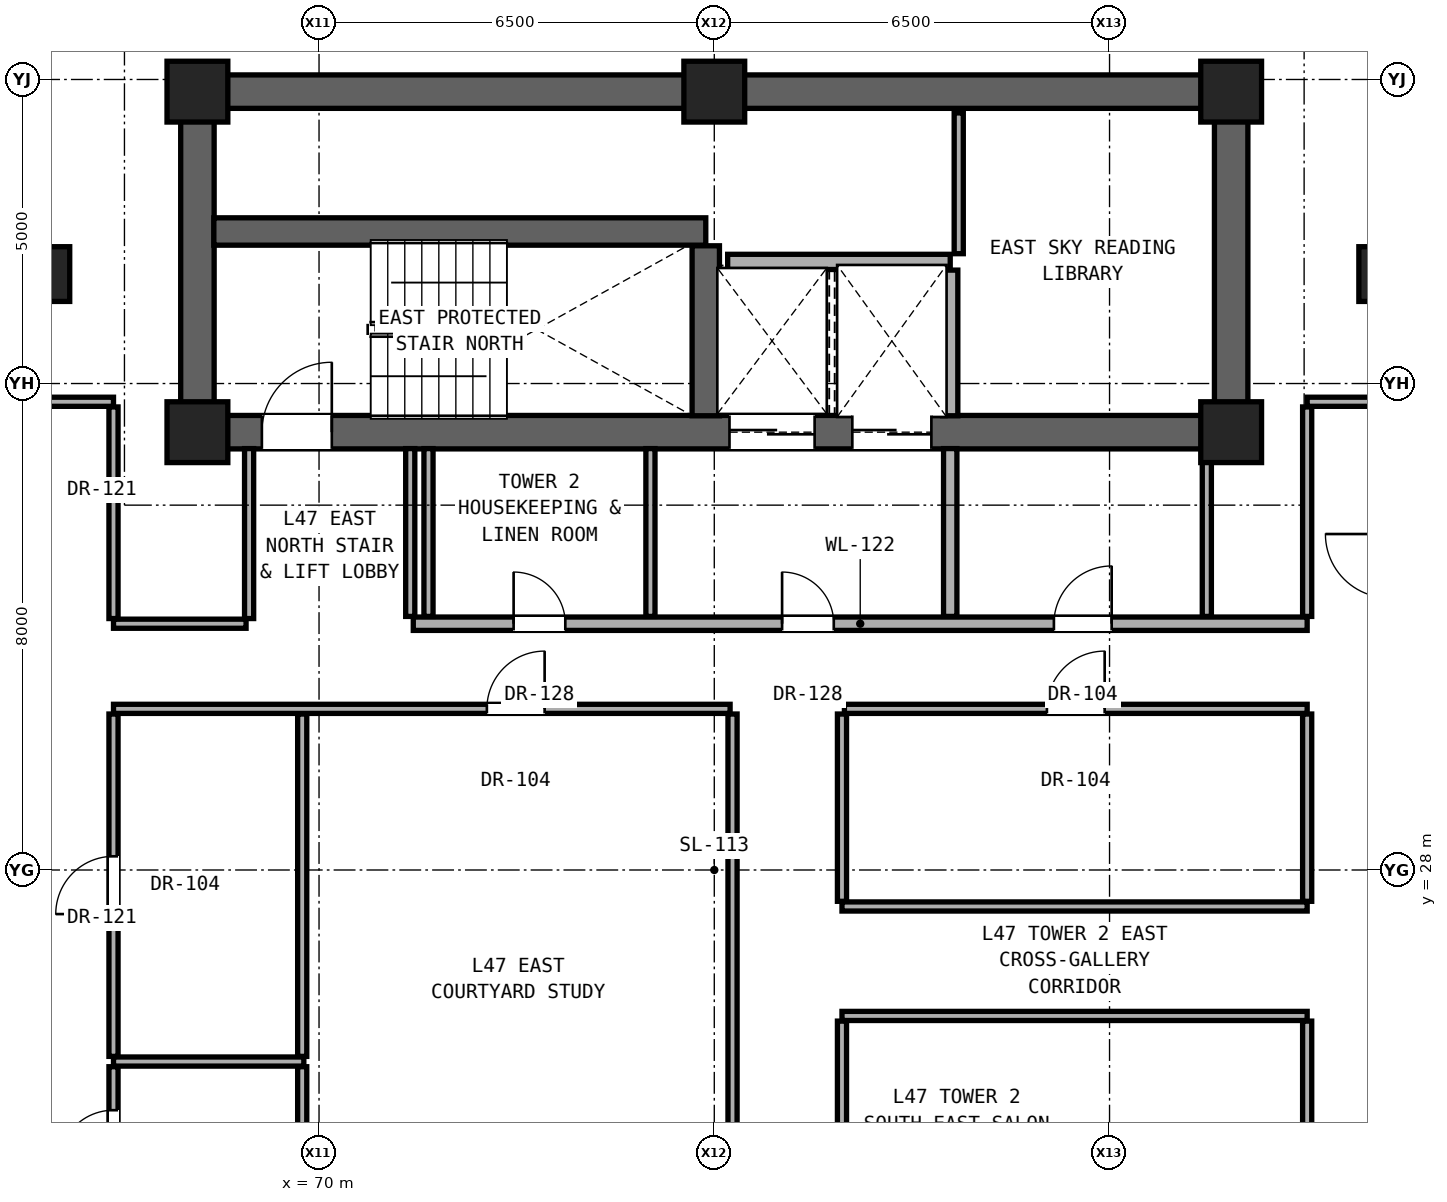
"""IFC4 building model, lengths in metres.
Left out: names, types, materials, properties, quantities, classifications, styles, units other than length and angle.
Written with IfcOpenShell. Run it as: python <this file> out.ifc"""

import sys

from ifc_helpers import new_model, si_unit, direction, frame, frame_2d, origin, origin_2d, place, context, subcontext, project, spatial, rectangle, extrude, element, fill, save


model = new_model("IFC4")
c1 = context("Model", 3, precision=1e-05, world=origin(), true_north=direction((0.0, 1.0)))
c2 = subcontext(c1, "Body", "Model", "MODEL_VIEW")
j1 = project(units=[si_unit("LENGTHUNIT", "METRE"), si_unit("PLANEANGLEUNIT", "RADIAN")], contexts=[c1])
p1 = place(None, origin())
s1 = spatial("IfcSite", under=j1, at=p1, CompositionType="ELEMENT")
p2 = place(p1, origin())
s2 = spatial("IfcBuilding", under=s1, at=p2, CompositionType="ELEMENT")
p3 = place(p2, frame((0.0, 0.0, 167.4)))
s3 = spatial("IfcBuildingStorey", under=s2, at=p3, CompositionType="ELEMENT", Elevation=167.4)
for number, where, z_axis, x_axis in (
    (1, (68.0, 35.2, 0.0), (0.0, 0.0, 1.0), (1.0, 0.0, 0.0)),
    (2, (85.0, 35.2, 0.0), (0.0, 0.0, 1.0), (1.0, 0.0, 0.0)),
    (3, (68.0, 40.8, 0.0), (0.0, 0.0, 1.0), (1.0, 0.0, 0.0)),
    (4, (76.5, 40.8, 0.0), (0.0, 0.0, 1.0), (1.0, 0.0, 0.0)),
    (5, (85.0, 40.8, 0.0), (0.0, 0.0, 1.0), (1.0, 0.0, 0.0)),
):
    element("IfcColumn", number, at=place(p3, frame(where, z_axis=z_axis, x_axis=x_axis)), inside=s3, PredefinedType="COLUMN", context=c2, shape_type="SweptSolid", body=[
        extrude(rectangle(XDim=1.0, YDim=1.0, at=origin_2d()), origin(), (0.0, 0.0, 1.0), 3.25),
    ])
for number, where, z_axis, x_axis in (
    (6, (65.6, 37.8, 0.0), (0.0, 0.0, 1.0), (1.0, 0.0, 0.0)),
    (7, (87.4, 37.8, 0.0), (0.0, 0.0, 1.0), (1.0, 0.0, 0.0)),
):
    element("IfcColumn", number, at=place(p3, frame(where, z_axis=z_axis, x_axis=x_axis)), inside=s3, PredefinedType="PILASTER", context=c2, shape_type="SweptSolid", body=[
        extrude(rectangle(XDim=0.6, YDim=0.9, at=origin_2d()), origin(), (0.0, 0.0, 1.0), 3.25),
    ])
p4 = place(p3, frame((68.0, 40.8, 0.0), z_axis=(0.0, 0.0, 1.0), x_axis=(1.0, 0.0, 0.0)))
e8 = element("IfcWall", 8, at=p4, inside=s3, PredefinedType="SHEAR", context=c2, shape_type="SweptSolid", body=[
    extrude(rectangle(XDim=17.0, YDim=0.55, at=frame_2d((8.5, 0.0))), origin(), (0.0, 0.0, 1.0), 3.05),
])
for number, where, z_axis, x_axis in (
    (9, (68.0, 35.2, 0.0), (0.0, 0.0, 1.0), (0.0, 1.0, 0.0)),
    (10, (85.0, 35.2, 0.0), (0.0, 0.0, 1.0), (0.0, 1.0, 0.0)),
):
    element("IfcWall", number, at=place(p3, frame(where, z_axis=z_axis, x_axis=x_axis)), inside=s3, PredefinedType="SHEAR", context=c2, shape_type="SweptSolid", body=[
        extrude(rectangle(XDim=5.6, YDim=0.55, at=frame_2d((2.8, 0.0))), origin(), (0.0, 0.0, 1.0), 3.05),
    ])
p5 = place(p3, frame((68.0, 35.2, 0.0), z_axis=(0.0, 0.0, 1.0), x_axis=(1.0, 0.0, 0.0)))
e11 = element("IfcWall", 11, at=p5, inside=s3, PredefinedType="SHEAR", context=c2, shape_type="SweptSolid", body=[
    extrude(rectangle(XDim=17.0, YDim=0.55, at=frame_2d((8.5, 0.0))), origin(), (0.0, 0.0, 1.0), 3.05),
])
p6 = place(p5, frame((1.06, 0.0, 0.0)))
e12 = element("IfcOpeningElement", 12, at=p6, cuts=e11, PredefinedType="OPENING", context=c2, shape_type="SweptSolid", body=[
    extrude(rectangle(XDim=1.15, YDim=2.2, at=frame_2d((0.575, 1.1))), frame((0.0, 0.285, 0.0), z_axis=(0.0, -1.0, 0.0), x_axis=(1.0, 0.0, 0.0)), (0.0, 0.0, 1.0), 0.57),
])
p7 = place(p5, frame((8.75, 0.0, 0.0)))
e13 = element("IfcOpeningElement", 13, at=p7, cuts=e11, PredefinedType="OPENING", context=c2, shape_type="SweptSolid", body=[
    extrude(rectangle(XDim=1.4, YDim=2.35, at=frame_2d((0.7, 1.175))), frame((0.0, 0.285, 0.0), z_axis=(0.0, -1.0, 0.0), x_axis=(1.0, 0.0, 0.0)), (0.0, 0.0, 1.0), 0.57),
])
p8 = place(p5, frame((10.77, 0.0, 0.0)))
e14 = element("IfcOpeningElement", 14, at=p8, cuts=e11, PredefinedType="OPENING", context=c2, shape_type="SweptSolid", body=[
    extrude(rectangle(XDim=1.3, YDim=2.3, at=frame_2d((0.65, 1.15))), frame((0.0, 0.285, 0.0), z_axis=(0.0, -1.0, 0.0), x_axis=(1.0, 0.0, 0.0)), (0.0, 0.0, 1.0), 0.57),
])
p9 = place(p3, frame((66.62, 24.85, 0.0), z_axis=(0.0, 0.0, 1.0), x_axis=(1.0, 0.0, 0.0)))
e15 = element("IfcWall", 15, at=p9, inside=s3, PredefinedType="PARTITIONING", context=c2, shape_type="SweptSolid", body=[
    extrude(rectangle(XDim=3.13, YDim=0.15, at=frame_2d((1.565, 0.0))), origin(), (0.0, 0.0, 1.0), 2.186),
])
for number, where, z_axis, x_axis in (
    (16, (78.6, 25.6, 0.0), (0.0, 0.0, 1.0), (1.0, 0.0, 0.0)),
    (17, (78.6, 27.4, 0.0), (0.0, 0.0, 1.0), (1.0, 0.0, 0.0)),
):
    element("IfcWall", number, at=place(p3, frame(where, z_axis=z_axis, x_axis=x_axis)), inside=s3, PredefinedType="PARTITIONING", context=c2, shape_type="SweptSolid", body=[
        extrude(rectangle(XDim=7.65, YDim=0.15, at=frame_2d((3.825, 0.0))), origin(), (0.0, 0.0, 1.0), 2.186),
    ])
p10 = place(p3, frame((66.62, 30.65, 0.0), z_axis=(0.0, 0.0, 1.0), x_axis=(1.0, 0.0, 0.0)))
e18 = element("IfcWall", 18, at=p10, inside=s3, PredefinedType="PARTITIONING", context=c2, shape_type="SweptSolid", body=[
    extrude(rectangle(XDim=10.14, YDim=0.15, at=frame_2d((5.07, 0.0))), origin(), (0.0, 0.0, 1.0), 2.186),
])
p11 = place(p10, frame((6.14, 0.0, 0.0)))
e19 = element("IfcOpeningElement", 19, at=p11, cuts=e18, PredefinedType="OPENING", context=c2, shape_type="SweptSolid", body=[
    extrude(rectangle(XDim=0.95, YDim=2.15, at=frame_2d((0.475, 1.075))), frame((0.0, 0.085, 0.0), z_axis=(0.0, -1.0, 0.0), x_axis=(1.0, 0.0, 0.0)), (0.0, 0.0, 1.0), 0.17),
])
p12 = place(p3, frame((78.64, 30.65, 0.0), z_axis=(0.0, 0.0, 1.0), x_axis=(1.0, 0.0, 0.0)))
e20 = element("IfcWall", 20, at=p12, inside=s3, PredefinedType="PARTITIONING", context=c2, shape_type="SweptSolid", body=[
    extrude(rectangle(XDim=7.61, YDim=0.15, at=frame_2d((3.805, 0.0))), origin(), (0.0, 0.0, 1.0), 2.186),
])
p13 = place(p12, frame((3.33, 0.0, 0.0)))
e21 = element("IfcOpeningElement", 21, at=p13, cuts=e20, PredefinedType="OPENING", context=c2, shape_type="SweptSolid", body=[
    extrude(rectangle(XDim=0.95, YDim=2.15, at=frame_2d((0.475, 1.075))), frame((0.0, 0.085, 0.0), z_axis=(0.0, -1.0, 0.0), x_axis=(1.0, 0.0, 0.0)), (0.0, 0.0, 1.0), 0.17),
])
p14 = place(p3, frame((66.62, 32.05, 0.0), z_axis=(0.0, 0.0, 1.0), x_axis=(1.0, 0.0, 0.0)))
e22 = element("IfcWall", 22, at=p14, inside=s3, PredefinedType="PARTITIONING", context=c2, shape_type="SweptSolid", body=[
    extrude(rectangle(XDim=2.18, YDim=0.15, at=frame_2d((1.09, 0.0))), origin(), (0.0, 0.0, 1.0), 2.186),
])
p15 = place(p3, frame((71.55, 32.05, 0.0), z_axis=(0.0, 0.0, 1.0), x_axis=(1.0, 0.0, 0.0)))
e23 = element("IfcWall", 23, at=p15, inside=s3, PredefinedType="SOLIDWALL", context=c2, shape_type="SweptSolid", body=[
    extrude(rectangle(XDim=14.7, YDim=0.22, at=frame_2d((7.35, 0.0))), origin(), (0.0, 0.0, 1.0), 2.186),
])
p16 = place(p15, frame((6.065, 0.0, 0.0)))
e24 = element("IfcOpeningElement", 24, at=p16, cuts=e23, PredefinedType="OPENING", context=c2, shape_type="SweptSolid", body=[
    extrude(rectangle(XDim=0.85, YDim=2.01, at=frame_2d((0.425, 1.005))), frame((0.0, 0.12, 0.0), z_axis=(0.0, -1.0, 0.0), x_axis=(1.0, 0.0, 0.0)), (0.0, 0.0, 1.0), 0.24),
])
p17 = place(p15, frame((10.535, 0.0, 0.0)))
e25 = element("IfcOpeningElement", 25, at=p17, cuts=e23, PredefinedType="OPENING", context=c2, shape_type="SweptSolid", body=[
    extrude(rectangle(XDim=0.95, YDim=2.15, at=frame_2d((0.475, 1.075))), frame((0.0, 0.12, 0.0), z_axis=(0.0, -1.0, 0.0), x_axis=(1.0, 0.0, 0.0)), (0.0, 0.0, 1.0), 0.24),
])
p18 = place(p15, frame((1.65, 0.0, 0.0)))
e26 = element("IfcOpeningElement", 26, at=p18, cuts=e23, PredefinedType="OPENING", context=c2, shape_type="SweptSolid", body=[
    extrude(rectangle(XDim=0.85, YDim=2.01, at=frame_2d((0.425, 1.005))), frame((0.0, 0.12, 0.0), z_axis=(0.0, -1.0, 0.0), x_axis=(1.0, 0.0, 0.0)), (0.0, 0.0, 1.0), 0.24),
])
p19 = place(p3, frame((65.25, 35.7, 0.0), z_axis=(0.0, 0.0, 1.0), x_axis=(1.0, 0.0, 0.0)))
e27 = element("IfcWall", 27, at=p19, inside=s3, PredefinedType="PARTITIONING", context=c2, shape_type="SweptSolid", body=[
    extrude(rectangle(XDim=1.37, YDim=0.15, at=frame_2d((0.685, 0.0))), origin(), (0.0, 0.0, 1.0), 3.05),
])
p20 = place(p3, frame((86.25, 35.7, 0.0), z_axis=(0.0, 0.0, 1.0), x_axis=(1.0, 0.0, 0.0)))
e28 = element("IfcWall", 28, at=p20, inside=s3, PredefinedType="PARTITIONING", context=c2, shape_type="SweptSolid", body=[
    extrude(rectangle(XDim=1.35, YDim=0.15, at=frame_2d((0.675, 0.0))), origin(), (0.0, 0.0, 1.0), 3.05),
])
p21 = place(p3, frame((76.72, 38.0, 0.0), z_axis=(0.0, 0.0, 1.0), x_axis=(1.0, 0.0, 0.0)))
e29 = element("IfcWall", 29, at=p21, inside=s3, PredefinedType="SOLIDWALL", context=c2, shape_type="SweptSolid", body=[
    extrude(rectangle(XDim=3.66, YDim=0.25, at=frame_2d((1.83, 0.0))), origin(), (0.0, 0.0, 1.0), 3.05),
])
p22 = place(p3, frame((68.27, 38.5, 0.0), z_axis=(0.0, 0.0, 1.0), x_axis=(1.0, 0.0, 0.0)))
e30 = element("IfcWall", 30, at=p22, inside=s3, PredefinedType="SHEAR", context=c2, shape_type="SweptSolid", body=[
    extrude(rectangle(XDim=8.09, YDim=0.45, at=frame_2d((4.045, 0.0))), origin(), (0.0, 0.0, 1.0), 3.05),
])
p23 = place(p3, frame((66.62, 22.435, 0.0), z_axis=(0.0, 0.0, 1.0), x_axis=(0.0, 1.0, 0.0)))
e31 = element("IfcWall", 31, at=p23, inside=s3, PredefinedType="PARTITIONING", context=c2, shape_type="SweptSolid", body=[
    extrude(rectangle(XDim=2.33, YDim=0.15, at=frame_2d((1.165, 0.0))), origin(), (0.0, 0.0, 1.0), 3.05),
])
p24 = place(p23, frame((0.715, 0.0, 0.0)))
e32 = element("IfcOpeningElement", 32, at=p24, cuts=e31, PredefinedType="OPENING", context=c2, shape_type="SweptSolid", body=[
    extrude(rectangle(XDim=0.9, YDim=2.1, at=frame_2d((0.45, 1.05))), frame((0.0, 0.085, 0.0), z_axis=(0.0, -1.0, 0.0), x_axis=(1.0, 0.0, 0.0)), (0.0, 0.0, 1.0), 0.17),
])
p25 = place(p3, frame((66.62, 24.935, 0.0), z_axis=(0.0, 0.0, 1.0), x_axis=(0.0, 1.0, 0.0)))
e33 = element("IfcWall", 33, at=p25, inside=s3, PredefinedType="PARTITIONING", context=c2, shape_type="SweptSolid", body=[
    extrude(rectangle(XDim=5.63, YDim=0.15, at=frame_2d((2.815, 0.0))), origin(), (0.0, 0.0, 1.0), 2.346),
])
p26 = place(p25, frame((2.34, 0.0, 0.0)))
e34 = element("IfcOpeningElement", 34, at=p26, cuts=e33, PredefinedType="OPENING", context=c2, shape_type="SweptSolid", body=[
    extrude(rectangle(XDim=0.95, YDim=2.15, at=frame_2d((0.475, 1.075))), frame((0.0, 0.085, 0.0), z_axis=(0.0, -1.0, 0.0), x_axis=(1.0, 0.0, 0.0)), (0.0, 0.0, 1.0), 0.17),
])
p27 = place(p3, frame((66.62, 32.135, 0.0), z_axis=(0.0, 0.0, 1.0), x_axis=(0.0, 1.0, 0.0)))
e35 = element("IfcWall", 35, at=p27, inside=s3, PredefinedType="PARTITIONING", context=c2, shape_type="SweptSolid", body=[
    extrude(rectangle(XDim=3.48, YDim=0.15, at=frame_2d((1.74, 0.0))), origin(), (0.0, 0.0, 1.0), 2.442),
])
p28 = place(p3, frame((68.85, 32.135, 0.0), z_axis=(0.0, 0.0, 1.0), x_axis=(0.0, 1.0, 0.0)))
e36 = element("IfcWall", 36, at=p28, inside=s3, PredefinedType="PARTITIONING", context=c2, shape_type="SweptSolid", body=[
    extrude(rectangle(XDim=2.795, YDim=0.15, at=frame_2d((1.397, 0.0))), origin(), (0.0, 0.0, 1.0), 3.05),
])
p29 = place(p3, frame((69.723, 22.435, 0.0), z_axis=(0.0, 0.0, 1.0), x_axis=(0.0, 1.0, 0.0)))
e37 = element("IfcWall", 37, at=p29, inside=s3, PredefinedType="PARTITIONING", context=c2, shape_type="SweptSolid", body=[
    extrude(rectangle(XDim=2.33, YDim=0.15, at=frame_2d((1.165, 0.0))), origin(), (0.0, 0.0, 1.0), 3.05),
])
p30 = place(p3, frame((69.723, 24.935, 0.0), z_axis=(0.0, 0.0, 1.0), x_axis=(0.0, 1.0, 0.0)))
e38 = element("IfcWall", 38, at=p30, inside=s3, PredefinedType="PARTITIONING", context=c2, shape_type="SweptSolid", body=[
    extrude(rectangle(XDim=5.63, YDim=0.15, at=frame_2d((2.815, 0.0))), origin(), (0.0, 0.0, 1.0), 2.186),
])
for number, where, z_axis, x_axis in (
    (39, (71.5, 32.17, 0.0), (0.0, 0.0, 1.0), (0.0, 1.0, 0.0)),
    (40, (71.8, 32.17, 0.0), (0.0, 0.0, 1.0), (0.0, 1.0, 0.0)),
    (41, (75.45, 32.17, 0.0), (0.0, 0.0, 1.0), (0.0, 1.0, 0.0)),
):
    element("IfcWall", number, at=place(p3, frame(where, z_axis=z_axis, x_axis=x_axis)), inside=s3, PredefinedType="PARTITIONING", context=c2, shape_type="SweptSolid", body=[
        extrude(rectangle(XDim=2.76, YDim=0.15, at=frame_2d((1.38, 0.0))), origin(), (0.0, 0.0, 1.0), 3.05),
    ])
p31 = place(p3, frame((76.36, 35.47, 0.0), z_axis=(0.0, 0.0, 1.0), x_axis=(0.0, 1.0, 0.0)))
e42 = element("IfcWall", 42, at=p31, inside=s3, PredefinedType="SHEAR", context=c2, shape_type="SweptSolid", body=[
    extrude(rectangle(XDim=2.795, YDim=0.45, at=frame_2d((1.397, 0.0))), origin(), (0.0, 0.0, 1.0), 3.05),
])
p32 = place(p3, frame((76.8, 22.435, 0.0), z_axis=(0.0, 0.0, 1.0), x_axis=(0.0, 1.0, 0.0)))
e43 = element("IfcWall", 43, at=p32, inside=s3, PredefinedType="PARTITIONING", context=c2, shape_type="SweptSolid", body=[
    extrude(rectangle(XDim=8.13, YDim=0.15, at=frame_2d((4.065, 0.0))), origin(), (0.0, 0.0, 1.0), 2.186),
])
p33 = place(p3, frame((78.6, 22.435, 0.0), z_axis=(0.0, 0.0, 1.0), x_axis=(0.0, 1.0, 0.0)))
e44 = element("IfcWall", 44, at=p33, inside=s3, PredefinedType="PARTITIONING", context=c2, shape_type="SweptSolid", body=[
    extrude(rectangle(XDim=3.08, YDim=0.15, at=frame_2d((1.54, 0.0))), origin(), (0.0, 0.0, 1.0), 3.05),
])
p34 = place(p3, frame((78.6, 27.485, 0.0), z_axis=(0.0, 0.0, 1.0), x_axis=(0.0, 1.0, 0.0)))
e45 = element("IfcWall", 45, at=p34, inside=s3, PredefinedType="PARTITIONING", context=c2, shape_type="SweptSolid", body=[
    extrude(rectangle(XDim=3.08, YDim=0.15, at=frame_2d((1.54, 0.0))), origin(), (0.0, 0.0, 1.0), 2.186),
])
p35 = place(p3, frame((80.38, 32.17, 0.0), z_axis=(0.0, 0.0, 1.0), x_axis=(0.0, 1.0, 0.0)))
e46 = element("IfcWall", 46, at=p35, inside=s3, PredefinedType="SOLIDWALL", context=c2, shape_type="SweptSolid", body=[
    extrude(rectangle(XDim=2.76, YDim=0.22, at=frame_2d((1.38, 0.0))), origin(), (0.0, 0.0, 1.0), 3.05),
])
p36 = place(p3, frame((80.38, 35.47, 0.0), z_axis=(0.0, 0.0, 1.0), x_axis=(0.0, 1.0, 0.0)))
e47 = element("IfcWall", 47, at=p36, inside=s3, PredefinedType="SOLIDWALL", context=c2, shape_type="SweptSolid", body=[
    extrude(rectangle(XDim=2.395, YDim=0.25, at=frame_2d((1.198, 0.0))), origin(), (0.0, 0.0, 1.0), 3.05),
])
p37 = place(p3, frame((80.52, 38.135, 0.0), z_axis=(0.0, 0.0, 1.0), x_axis=(0.0, 1.0, 0.0)))
e48 = element("IfcWall", 48, at=p37, inside=s3, PredefinedType="PARTITIONING", context=c2, shape_type="SweptSolid", body=[
    extrude(rectangle(XDim=2.315, YDim=0.15, at=frame_2d((1.157, 0.0))), origin(), (0.0, 0.0, 1.0), 3.05),
])
p38 = place(p3, frame((84.6, 32.17, 0.0), z_axis=(0.0, 0.0, 1.0), x_axis=(0.0, 1.0, 0.0)))
e49 = element("IfcWall", 49, at=p38, inside=s3, PredefinedType="PARTITIONING", context=c2, shape_type="SweptSolid", body=[
    extrude(rectangle(XDim=2.76, YDim=0.15, at=frame_2d((1.38, 0.0))), origin(), (0.0, 0.0, 1.0), 3.05),
])
p39 = place(p3, frame((86.25, 22.435, 0.0), z_axis=(0.0, 0.0, 1.0), x_axis=(0.0, 1.0, 0.0)))
e50 = element("IfcWall", 50, at=p39, inside=s3, PredefinedType="PARTITIONING", context=c2, shape_type="SweptSolid", body=[
    extrude(rectangle(XDim=3.08, YDim=0.15, at=frame_2d((1.54, 0.0))), origin(), (0.0, 0.0, 1.0), 3.05),
])
p40 = place(p3, frame((86.25, 27.485, 0.0), z_axis=(0.0, 0.0, 1.0), x_axis=(0.0, 1.0, 0.0)))
e51 = element("IfcWall", 51, at=p40, inside=s3, PredefinedType="PARTITIONING", context=c2, shape_type="SweptSolid", body=[
    extrude(rectangle(XDim=3.08, YDim=0.15, at=frame_2d((1.54, 0.0))), origin(), (0.0, 0.0, 1.0), 2.346),
])
p41 = place(p3, frame((86.25, 32.17, 0.0), z_axis=(0.0, 0.0, 1.0), x_axis=(0.0, 1.0, 0.0)))
e52 = element("IfcWall", 52, at=p41, inside=s3, PredefinedType="PARTITIONING", context=c2, shape_type="SweptSolid", body=[
    extrude(rectangle(XDim=3.445, YDim=0.15, at=frame_2d((1.723, 0.0))), origin(), (0.0, 0.0, 1.0), 2.442),
])
p42 = place(p6, origin())
e53 = element("IfcDoor", 53, at=p42, inside=s3, OperationType="SINGLE_SWING_RIGHT", PredefinedType="DOOR", context=c2, shape_type="SweptSolid", body=[
    extrude(rectangle(XDim=1.15, YDim=2.2, at=frame_2d((0.575, 1.1))), frame((0.0, 0.025, 0.0), z_axis=(0.0, -1.0, 0.0), x_axis=(1.0, 0.0, 0.0)), (0.0, 0.0, 1.0), 0.05),
])
fill(e12, e53)
p43 = place(p16, origin())
e54 = element("IfcDoor", 54, at=p43, inside=s3, OperationType="SINGLE_SWING_LEFT", PredefinedType="DOOR", context=c2, shape_type="SweptSolid", body=[
    extrude(rectangle(XDim=0.85, YDim=2.01, at=frame_2d((0.425, 1.005))), frame((0.0, 0.025, 0.0), z_axis=(0.0, -1.0, 0.0), x_axis=(1.0, 0.0, 0.0)), (0.0, 0.0, 1.0), 0.05),
])
fill(e24, e54)
p44 = place(p17, origin())
e55 = element("IfcDoor", 55, at=p44, inside=s3, OperationType="SINGLE_SWING_RIGHT", PredefinedType="DOOR", context=c2, shape_type="SweptSolid", body=[
    extrude(rectangle(XDim=0.95, YDim=2.15, at=frame_2d((0.475, 1.075))), frame((0.0, 0.025, 0.0), z_axis=(0.0, -1.0, 0.0), x_axis=(1.0, 0.0, 0.0)), (0.0, 0.0, 1.0), 0.05),
])
fill(e25, e55)
p45 = place(p18, origin())
e56 = element("IfcDoor", 56, at=p45, inside=s3, OperationType="SINGLE_SWING_LEFT", PredefinedType="DOOR", context=c2, shape_type="SweptSolid", body=[
    extrude(rectangle(XDim=0.85, YDim=2.01, at=frame_2d((0.425, 1.005))), frame((0.0, 0.025, 0.0), z_axis=(0.0, -1.0, 0.0), x_axis=(1.0, 0.0, 0.0)), (0.0, 0.0, 1.0), 0.05),
])
fill(e26, e56)
p46 = place(p24, origin())
e57 = element("IfcDoor", 57, at=p46, inside=s3, OperationType="SINGLE_SWING_LEFT", PredefinedType="DOOR", context=c2, shape_type="SweptSolid", body=[
    extrude(rectangle(XDim=0.9, YDim=2.1, at=frame_2d((0.45, 1.05))), frame((0.0, 0.025, 0.0), z_axis=(0.0, -1.0, 0.0), x_axis=(1.0, 0.0, 0.0)), (0.0, 0.0, 1.0), 0.05),
])
fill(e32, e57)
p47 = place(p26, origin())
e58 = element("IfcDoor", 58, at=p47, inside=s3, OperationType="SINGLE_SWING_LEFT", PredefinedType="DOOR", context=c2, shape_type="SweptSolid", body=[
    extrude(rectangle(XDim=0.95, YDim=2.15, at=frame_2d((0.475, 1.075))), frame((0.0, 0.025, 0.0), z_axis=(0.0, -1.0, 0.0), x_axis=(1.0, 0.0, 0.0)), (0.0, 0.0, 1.0), 0.05),
])
fill(e34, e58)
p48 = place(p11, origin())
e59 = element("IfcDoor", 59, at=p48, inside=s3, OperationType="SINGLE_SWING_RIGHT", PredefinedType="DOOR", context=c2, shape_type="SweptSolid", body=[
    extrude(rectangle(XDim=0.95, YDim=2.15, at=frame_2d((0.475, 1.075))), frame((0.0, 0.025, 0.0), z_axis=(0.0, -1.0, 0.0), x_axis=(1.0, 0.0, 0.0)), (0.0, 0.0, 1.0), 0.05),
])
fill(e19, e59)
p49 = place(p13, origin())
e60 = element("IfcDoor", 60, at=p49, inside=s3, OperationType="SINGLE_SWING_RIGHT", PredefinedType="DOOR", context=c2, shape_type="SweptSolid", body=[
    extrude(rectangle(XDim=0.95, YDim=2.15, at=frame_2d((0.475, 1.075))), frame((0.0, 0.025, 0.0), z_axis=(0.0, -1.0, 0.0), x_axis=(1.0, 0.0, 0.0)), (0.0, 0.0, 1.0), 0.05),
])
fill(e21, e60)
p50 = place(p7, origin())
e61 = element("IfcDoor", 61, at=p50, inside=s3, OperationType="DOUBLE_DOOR_SLIDING", PredefinedType="DOOR", context=c2, shape_type="SweptSolid", body=[
    extrude(rectangle(XDim=1.4, YDim=2.35, at=frame_2d((0.7, 1.175))), frame((0.0, 0.025, 0.0), z_axis=(0.0, -1.0, 0.0), x_axis=(1.0, 0.0, 0.0)), (0.0, 0.0, 1.0), 0.05),
])
fill(e13, e61)
p51 = place(p8, origin())
e62 = element("IfcDoor", 62, at=p51, inside=s3, OperationType="DOUBLE_DOOR_SLIDING", PredefinedType="DOOR", context=c2, shape_type="SweptSolid", body=[
    extrude(rectangle(XDim=1.3, YDim=2.3, at=frame_2d((0.65, 1.15))), frame((0.0, 0.025, 0.0), z_axis=(0.0, -1.0, 0.0), x_axis=(1.0, 0.0, 0.0)), (0.0, 0.0, 1.0), 0.05),
])
fill(e14, e62)
save(model, sys.argv[1])
